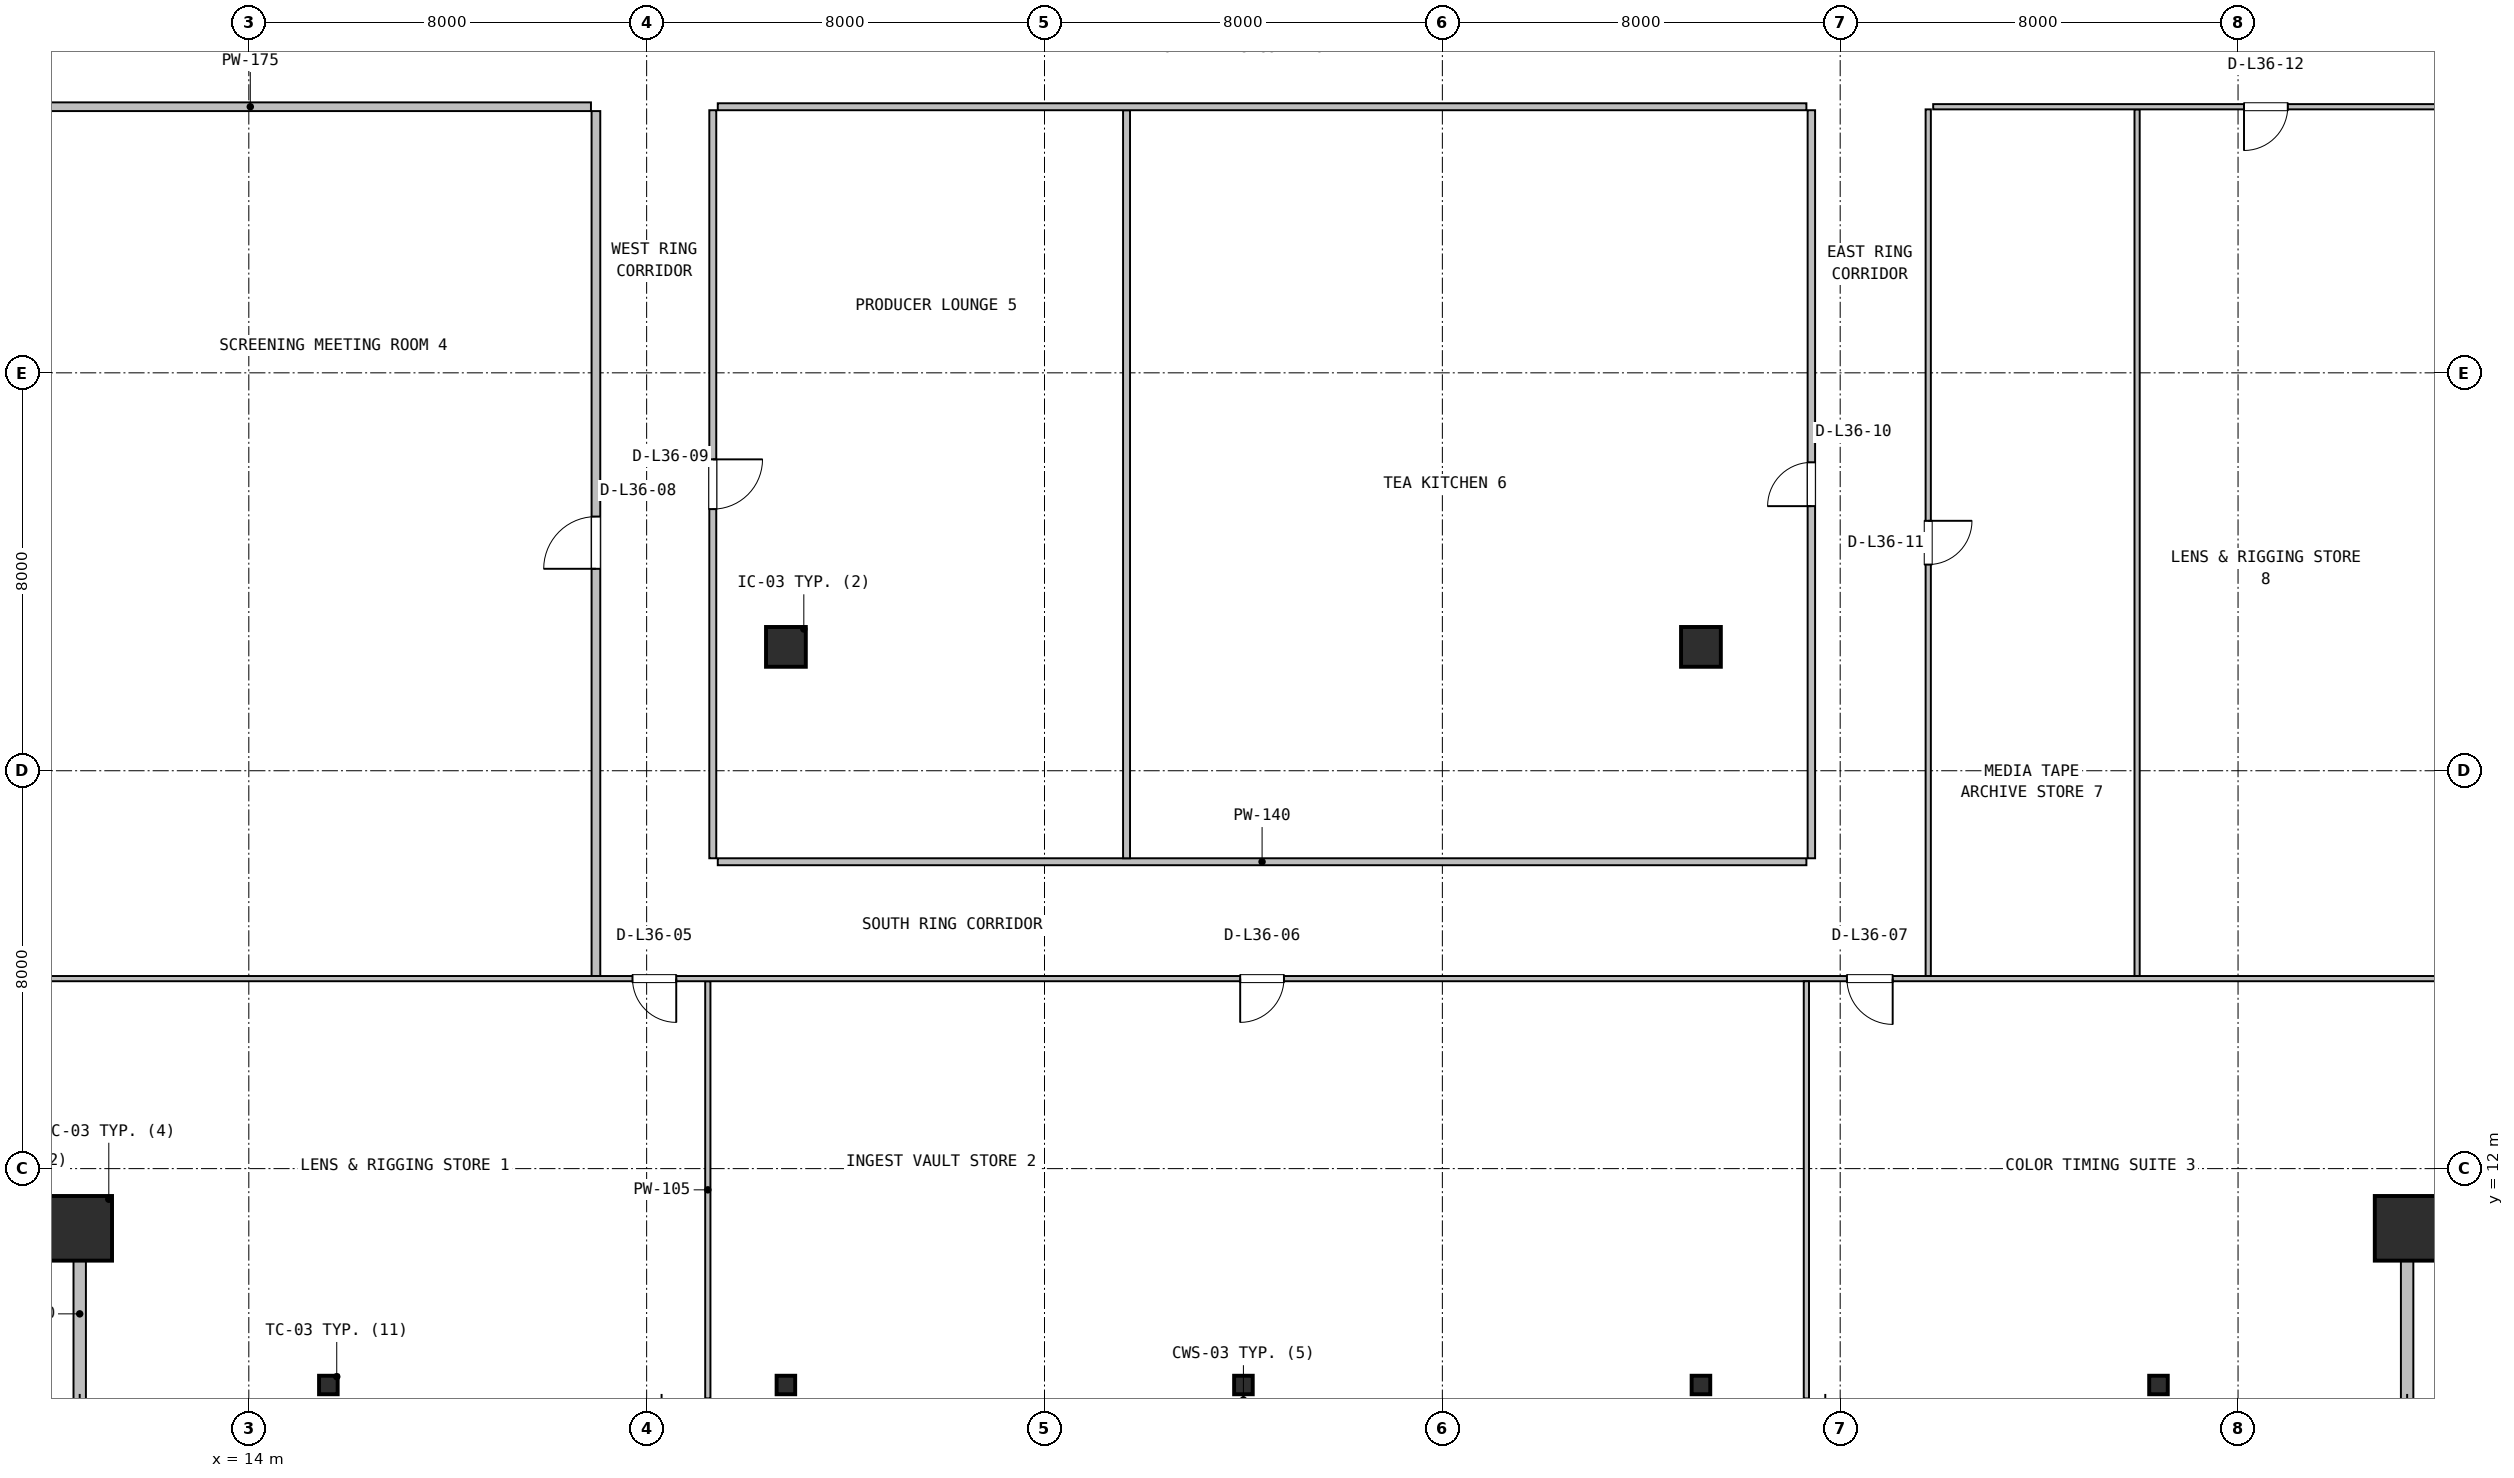
"""IFC4 building model, lengths in metres.
Left out: names, types, materials, properties, quantities, classifications, styles, units other than length and angle.
Written with IfcOpenShell. Run it as: python <this file> out.ifc"""

import sys

from ifc_helpers import new_model, si_unit, direction, frame, frame_2d, origin, origin_2d, place, context, subcontext, project, spatial, rectangle, hollow_rectangle, i_section, extrude, source, transform, mapped, element, fill, save


model = new_model("IFC4")
c1 = context("Model", 3, precision=1e-05, world=origin(), true_north=direction((0.0, 1.0)))
c2 = subcontext(c1, "Body", "Model", "MODEL_VIEW")
j1 = project(units=[si_unit("LENGTHUNIT", "METRE"), si_unit("PLANEANGLEUNIT", "RADIAN")], contexts=[c1])
p1 = place(None, origin())
s1 = spatial("IfcSite", under=j1, at=p1, CompositionType="ELEMENT")
p2 = place(p1, origin())
s2 = spatial("IfcBuilding", under=s1, at=p2, CompositionType="ELEMENT")
p3 = place(p2, frame((0.0, 0.0, 149.6)))
s3 = spatial("IfcBuildingStorey", under=s2, at=p3, CompositionType="ELEMENT", Elevation=149.6)
m1 = source(origin(), c2, "Body", "SweptSolid", [
    extrude(hollow_rectangle(XDim=1.3, YDim=1.3, WallThickness=0.05, at=origin_2d()), origin(), (0.0, 0.0, 1.0), 3.8),
])
for number, where, z_axis, x_axis in (
    (1, (10.6, 10.8, 0.0), (0.0, 0.0, 1.0), (1.0, 0.0, 0.0)),
    (2, (57.4, 10.8, 0.0), (0.0, 0.0, 1.0), (1.0, 0.0, 0.0)),
):
    element("IfcColumn", number, at=place(p3, frame(where, z_axis=z_axis, x_axis=x_axis)), inside=s3, PredefinedType="COLUMN", context=c2, shape_type="MappedRepresentation", body=[
        mapped(m1, transform((0.0, 0.0, 0.0), x_axis=(1.0, 0.0, 0.0), y_axis=(0.0, 1.0, 0.0), z_axis=(0.0, 0.0, 1.0), scale=1.0)),
    ])
m2 = source(origin(), c2, "Body", "SweptSolid", [
    extrude(i_section(OverallWidth=0.374, OverallDepth=0.372, WebThickness=0.016, FlangeThickness=0.026, FilletRadius=0.016, at=origin_2d()), origin(), (0.0, 0.0, 1.0), 3.8),
])
for number, where, z_axis, x_axis in (
    (3, (15.6, 7.65, 0.0), (0.0, 0.0, 1.0), (1.0, 0.0, 0.0)),
    (4, (24.8, 7.65, 0.0), (0.0, 0.0, 1.0), (1.0, 0.0, 0.0)),
    (5, (34.0, 7.65, 0.0), (0.0, 0.0, 1.0), (1.0, 0.0, 0.0)),
    (6, (43.2, 7.65, 0.0), (0.0, 0.0, 1.0), (1.0, 0.0, 0.0)),
    (7, (52.4, 7.65, 0.0), (0.0, 0.0, 1.0), (1.0, 0.0, 0.0)),
):
    element("IfcColumn", number, at=place(p3, frame(where, z_axis=z_axis, x_axis=x_axis)), inside=s3, PredefinedType="COLUMN", context=c2, shape_type="MappedRepresentation", body=[
        mapped(m2, transform((0.0, 0.0, 0.0), x_axis=(1.0, 0.0, 0.0), y_axis=(0.0, 1.0, 0.0), z_axis=(0.0, 0.0, 1.0), scale=1.0)),
    ])
m3 = source(origin(), c2, "Body", "SweptSolid", [
    extrude(rectangle(XDim=0.8, YDim=0.8, at=origin_2d()), origin(), (0.0, 0.0, 1.0), 3.8),
])
for number, where, z_axis, x_axis in (
    (8, (24.8, 22.49, 0.0), (0.0, 0.0, 1.0), (1.0, 0.0, 0.0)),
    (9, (43.2, 22.49, 0.0), (0.0, 0.0, 1.0), (1.0, 0.0, 0.0)),
):
    element("IfcColumn", number, at=place(p3, frame(where, z_axis=z_axis, x_axis=x_axis)), inside=s3, PredefinedType="COLUMN", context=c2, shape_type="MappedRepresentation", body=[
        mapped(m3, transform((0.0, 0.0, 0.0), x_axis=(1.0, 0.0, 0.0), y_axis=(0.0, 1.0, 0.0), z_axis=(0.0, 0.0, 1.0), scale=1.0)),
    ])
for number, where, z_axis, x_axis in (
    (10, (10.6, 7.28, 0.0), (0.0, 0.0, 1.0), (0.0, 1.0, 0.0)),
    (11, (57.4, 7.28, 0.0), (0.0, 0.0, 1.0), (0.0, 1.0, 0.0)),
):
    element("IfcWall", number, at=place(p3, frame(where, z_axis=z_axis, x_axis=x_axis)), inside=s3, PredefinedType="SOLIDWALL", context=c2, shape_type="SweptSolid", body=[
        extrude(rectangle(XDim=3.6, YDim=0.25, at=frame_2d((1.8, 0.0))), origin(), (0.0, 0.0, 1.0), 3.108),
    ])
p4 = place(p3, frame((23.23, 7.38, 0.0), z_axis=(0.0, 0.0, 1.0), x_axis=(0.0, 1.0, 0.0)))
e12 = element("IfcWall", 12, at=p4, inside=s3, PredefinedType="PARTITIONING", context=c2, shape_type="SweptSolid", body=[
    extrude(rectangle(XDim=8.388, YDim=0.105, at=frame_2d((4.194, 0.0))), origin(), (0.0, 0.0, 1.0), 3.108),
])
p5 = place(p3, frame((7.18, 15.82, 0.0), z_axis=(0.0, 0.0, 1.0), x_axis=(1.0, 0.0, 0.0)))
e13 = element("IfcWall", 13, at=p5, inside=s3, PredefinedType="PARTITIONING", context=c2, shape_type="SweptSolid", body=[
    extrude(rectangle(XDim=53.64, YDim=0.105, at=frame_2d((26.82, 0.0))), origin(), (0.0, 0.0, 1.0), 2.909),
])
p6 = place(p5, frame((14.535, 0.0, 0.0)))
e14 = element("IfcOpeningElement", 14, at=p6, cuts=e13, PredefinedType="OPENING", context=c2, shape_type="SweptSolid", body=[
    extrude(rectangle(XDim=0.88, YDim=2.06, at=frame_2d((0.44, 1.03))), frame((0.0, 0.062, 0.0), z_axis=(0.0, -1.0, 0.0), x_axis=(1.0, 0.0, 0.0)), (0.0, 0.0, 1.0), 0.125),
])
p7 = place(p5, frame((26.755, 0.0, 0.0)))
e15 = element("IfcOpeningElement", 15, at=p7, cuts=e13, PredefinedType="OPENING", context=c2, shape_type="SweptSolid", body=[
    extrude(rectangle(XDim=0.88, YDim=2.06, at=frame_2d((0.44, 1.03))), frame((0.0, 0.062, 0.0), z_axis=(0.0, -1.0, 0.0), x_axis=(1.0, 0.0, 0.0)), (0.0, 0.0, 1.0), 0.125),
])
p8 = place(p5, frame((38.955, 0.0, 0.0)))
e16 = element("IfcOpeningElement", 16, at=p8, cuts=e13, PredefinedType="OPENING", context=c2, shape_type="SweptSolid", body=[
    extrude(rectangle(XDim=0.92, YDim=2.08, at=frame_2d((0.46, 1.04))), frame((0.0, 0.062, 0.0), z_axis=(0.0, -1.0, 0.0), x_axis=(1.0, 0.0, 0.0)), (0.0, 0.0, 1.0), 0.125),
])
p9 = place(p3, frame((45.32, 7.38, 0.0), z_axis=(0.0, 0.0, 1.0), x_axis=(0.0, 1.0, 0.0)))
e17 = element("IfcWall", 17, at=p9, inside=s3, PredefinedType="PARTITIONING", context=c2, shape_type="SweptSolid", body=[
    extrude(rectangle(XDim=8.388, YDim=0.105, at=frame_2d((4.194, 0.0))), origin(), (0.0, 0.0, 1.0), 3.108),
])
p10 = place(p3, frame((20.98, 15.873, 0.0), z_axis=(0.0, 0.0, 1.0), x_axis=(0.0, 1.0, 0.0)))
e18 = element("IfcWall", 18, at=p10, inside=s3, PredefinedType="PARTITIONING", context=c2, shape_type="SweptSolid", body=[
    extrude(rectangle(XDim=17.39, YDim=0.175, at=frame_2d((8.695, 0.0))), origin(), (0.0, 0.0, 1.0), 3.222),
])
p11 = place(p10, frame((8.187, 0.0, 0.0)))
e19 = element("IfcOpeningElement", 19, at=p11, cuts=e18, PredefinedType="OPENING", context=c2, shape_type="SweptSolid", body=[
    extrude(rectangle(XDim=1.05, YDim=2.1, at=frame_2d((0.525, 1.05))), frame((0.0, 0.098, 0.0), z_axis=(0.0, -1.0, 0.0), x_axis=(1.0, 0.0, 0.0)), (0.0, 0.0, 1.0), 0.195),
])
p12 = place(p3, frame((7.18, 33.35, 0.0), z_axis=(0.0, 0.0, 1.0), x_axis=(1.0, 0.0, 0.0)))
e20 = element("IfcWall", 20, at=p12, inside=s3, PredefinedType="PARTITIONING", context=c2, shape_type="SweptSolid", body=[
    extrude(rectangle(XDim=13.7, YDim=0.175, at=frame_2d((6.85, 0.0))), origin(), (0.0, 0.0, 1.0), 3.108),
])
p13 = place(p3, frame((23.43, 18.17, 0.0), z_axis=(0.0, 0.0, 1.0), x_axis=(1.0, 0.0, 0.0)))
e21 = element("IfcWall", 21, at=p13, inside=s3, PredefinedType="PARTITIONING", context=c2, shape_type="SweptSolid", body=[
    extrude(rectangle(XDim=21.89, YDim=0.14, at=frame_2d((10.945, 0.0))), origin(), (0.0, 0.0, 1.0), 2.909),
])
p14 = place(p3, frame((31.65, 18.24, 0.0), z_axis=(0.0, 0.0, 1.0), x_axis=(0.0, 1.0, 0.0)))
e22 = element("IfcWall", 22, at=p14, inside=s3, PredefinedType="PARTITIONING", context=c2, shape_type="SweptSolid", body=[
    extrude(rectangle(XDim=15.04, YDim=0.14, at=frame_2d((7.52, 0.0))), origin(), (0.0, 0.0, 1.0), 2.909),
])
p15 = place(p3, frame((23.43, 33.35, 0.0), z_axis=(0.0, 0.0, 1.0), x_axis=(1.0, 0.0, 0.0)))
e23 = element("IfcWall", 23, at=p15, inside=s3, PredefinedType="PARTITIONING", context=c2, shape_type="SweptSolid", body=[
    extrude(rectangle(XDim=21.89, YDim=0.14, at=frame_2d((10.945, 0.0))), origin(), (0.0, 0.0, 1.0), 2.909),
])
p16 = place(p3, frame((23.33, 18.24, 0.0), z_axis=(0.0, 0.0, 1.0), x_axis=(0.0, 1.0, 0.0)))
e24 = element("IfcWall", 24, at=p16, inside=s3, PredefinedType="PARTITIONING", context=c2, shape_type="SweptSolid", body=[
    extrude(rectangle(XDim=15.04, YDim=0.14, at=frame_2d((7.52, 0.0))), origin(), (0.0, 0.0, 1.0), 3.222),
])
p17 = place(p16, frame((7.02, 0.0, 0.0)))
e25 = element("IfcOpeningElement", 25, at=p17, cuts=e24, PredefinedType="OPENING", context=c2, shape_type="SweptSolid", body=[
    extrude(rectangle(XDim=1.0, YDim=2.1, at=frame_2d((0.5, 1.05))), frame((0.0, 0.08, 0.0), z_axis=(0.0, -1.0, 0.0), x_axis=(1.0, 0.0, 0.0)), (0.0, 0.0, 1.0), 0.16),
])
p18 = place(p3, frame((45.42, 18.24, 0.0), z_axis=(0.0, 0.0, 1.0), x_axis=(0.0, 1.0, 0.0)))
e26 = element("IfcWall", 26, at=p18, inside=s3, PredefinedType="PARTITIONING", context=c2, shape_type="SweptSolid", body=[
    extrude(rectangle(XDim=15.04, YDim=0.15, at=frame_2d((7.52, 0.0))), origin(), (0.0, 0.0, 1.0), 3.222),
])
p19 = place(p18, frame((7.08, 0.0, 0.0)))
e27 = element("IfcOpeningElement", 27, at=p19, cuts=e26, PredefinedType="OPENING", context=c2, shape_type="SweptSolid", body=[
    extrude(rectangle(XDim=0.88, YDim=2.06, at=frame_2d((0.44, 1.03))), frame((0.0, 0.085, 0.0), z_axis=(0.0, -1.0, 0.0), x_axis=(1.0, 0.0, 0.0)), (0.0, 0.0, 1.0), 0.17),
])
p20 = place(p3, frame((51.97, 15.873, 0.0), z_axis=(0.0, 0.0, 1.0), x_axis=(0.0, 1.0, 0.0)))
e28 = element("IfcWall", 28, at=p20, inside=s3, PredefinedType="PARTITIONING", context=c2, shape_type="SweptSolid", body=[
    extrude(rectangle(XDim=17.424, YDim=0.105, at=frame_2d((8.712, 0.0))), origin(), (0.0, 0.0, 1.0), 3.222),
])
p21 = place(p3, frame((47.87, 33.35, 0.0), z_axis=(0.0, 0.0, 1.0), x_axis=(1.0, 0.0, 0.0)))
e29 = element("IfcWall", 29, at=p21, inside=s3, PredefinedType="PARTITIONING", context=c2, shape_type="SweptSolid", body=[
    extrude(rectangle(XDim=12.95, YDim=0.105, at=frame_2d((6.475, 0.0))), origin(), (0.0, 0.0, 1.0), 3.108),
])
p22 = place(p21, frame((6.25, 0.0, 0.0)))
e30 = element("IfcOpeningElement", 30, at=p22, cuts=e29, PredefinedType="OPENING", context=c2, shape_type="SweptSolid", body=[
    extrude(rectangle(XDim=0.88, YDim=2.06, at=frame_2d((0.44, 1.03))), frame((0.0, 0.062, 0.0), z_axis=(0.0, -1.0, 0.0), x_axis=(1.0, 0.0, 0.0)), (0.0, 0.0, 1.0), 0.125),
])
p23 = place(p3, frame((47.77, 15.873, 0.0), z_axis=(0.0, 0.0, 1.0), x_axis=(0.0, 1.0, 0.0)))
e31 = element("IfcWall", 31, at=p23, inside=s3, PredefinedType="PARTITIONING", context=c2, shape_type="SweptSolid", body=[
    extrude(rectangle(XDim=17.424, YDim=0.105, at=frame_2d((8.712, 0.0))), origin(), (0.0, 0.0, 1.0), 3.222),
])
p24 = place(p23, frame((8.272, 0.0, 0.0)))
e32 = element("IfcOpeningElement", 32, at=p24, cuts=e31, PredefinedType="OPENING", context=c2, shape_type="SweptSolid", body=[
    extrude(rectangle(XDim=0.88, YDim=2.06, at=frame_2d((0.44, 1.03))), frame((0.0, 0.062, 0.0), z_axis=(0.0, -1.0, 0.0), x_axis=(1.0, 0.0, 0.0)), (0.0, 0.0, 1.0), 0.125),
])
m4 = source(origin(), c2, "Body", "SweptSolid", [
    extrude(rectangle(XDim=0.88, YDim=2.06, at=frame_2d((0.44, 1.03))), frame((0.0, 0.025, 0.0), z_axis=(0.0, -1.0, 0.0), x_axis=(1.0, 0.0, 0.0)), (0.0, 0.0, 1.0), 0.05),
])
p25 = place(p6, frame((0.88, 0.0, 0.0), z_axis=(0.0, 0.0, 1.0), x_axis=(-1.0, 0.0, 0.0)))
e33 = element("IfcDoor", 33, at=p25, inside=s3, OperationType="SINGLE_SWING_RIGHT", PredefinedType="DOOR", context=c2, shape_type="MappedRepresentation", body=[
    mapped(m4, transform((0.0, 0.0, 0.0), x_axis=(1.0, 0.0, 0.0), y_axis=(0.0, 1.0, 0.0), z_axis=(0.0, 0.0, 1.0), scale=1.0)),
])
fill(e14, e33)
p26 = place(p7, frame((0.88, 0.0, 0.0), z_axis=(0.0, 0.0, 1.0), x_axis=(-1.0, 0.0, 0.0)))
e34 = element("IfcDoor", 34, at=p26, inside=s3, OperationType="SINGLE_SWING_LEFT", PredefinedType="DOOR", context=c2, shape_type="MappedRepresentation", body=[
    mapped(m4, transform((0.0, 0.0, 0.0), x_axis=(1.0, 0.0, 0.0), y_axis=(0.0, 1.0, 0.0), z_axis=(0.0, 0.0, 1.0), scale=1.0)),
])
fill(e15, e34)
m5 = source(origin(), c2, "Body", "SweptSolid", [
    extrude(rectangle(XDim=0.92, YDim=2.08, at=frame_2d((0.46, 1.04))), frame((0.0, 0.025, 0.0), z_axis=(0.0, -1.0, 0.0), x_axis=(1.0, 0.0, 0.0)), (0.0, 0.0, 1.0), 0.05),
])
p27 = place(p8, frame((0.92, 0.0, 0.0), z_axis=(0.0, 0.0, 1.0), x_axis=(-1.0, 0.0, 0.0)))
e35 = element("IfcDoor", 35, at=p27, inside=s3, OperationType="SINGLE_SWING_RIGHT", PredefinedType="DOOR", context=c2, shape_type="MappedRepresentation", body=[
    mapped(m5, transform((0.0, 0.0, 0.0), x_axis=(1.0, 0.0, 0.0), y_axis=(0.0, 1.0, 0.0), z_axis=(0.0, 0.0, 1.0), scale=1.0)),
])
fill(e16, e35)
m6 = source(origin(), c2, "Body", "SweptSolid", [
    extrude(rectangle(XDim=1.05, YDim=2.1, at=frame_2d((0.525, 1.05))), frame((0.0, 0.025, 0.0), z_axis=(0.0, -1.0, 0.0), x_axis=(1.0, 0.0, 0.0)), (0.0, 0.0, 1.0), 0.05),
])
p28 = place(p11, origin())
e36 = element("IfcDoor", 36, at=p28, inside=s3, OperationType="SINGLE_SWING_LEFT", PredefinedType="DOOR", context=c2, shape_type="MappedRepresentation", body=[
    mapped(m6, transform((0.0, 0.0, 0.0), x_axis=(1.0, 0.0, 0.0), y_axis=(0.0, 1.0, 0.0), z_axis=(0.0, 0.0, 1.0), scale=1.0)),
])
fill(e19, e36)
m7 = source(origin(), c2, "Body", "SweptSolid", [
    extrude(rectangle(XDim=1.0, YDim=2.1, at=frame_2d((0.5, 1.05))), frame((0.0, 0.025, 0.0), z_axis=(0.0, -1.0, 0.0), x_axis=(1.0, 0.0, 0.0)), (0.0, 0.0, 1.0), 0.05),
])
p29 = place(p17, frame((1.0, 0.0, 0.0), z_axis=(0.0, 0.0, 1.0), x_axis=(-1.0, 0.0, 0.0)))
e37 = element("IfcDoor", 37, at=p29, inside=s3, OperationType="SINGLE_SWING_RIGHT", PredefinedType="DOOR", context=c2, shape_type="MappedRepresentation", body=[
    mapped(m7, transform((0.0, 0.0, 0.0), x_axis=(1.0, 0.0, 0.0), y_axis=(0.0, 1.0, 0.0), z_axis=(0.0, 0.0, 1.0), scale=1.0)),
])
fill(e25, e37)
p30 = place(p19, origin())
e38 = element("IfcDoor", 38, at=p30, inside=s3, OperationType="SINGLE_SWING_LEFT", PredefinedType="DOOR", context=c2, shape_type="MappedRepresentation", body=[
    mapped(m4, transform((0.0, 0.0, 0.0), x_axis=(1.0, 0.0, 0.0), y_axis=(0.0, 1.0, 0.0), z_axis=(0.0, 0.0, 1.0), scale=1.0)),
])
fill(e27, e38)
p31 = place(p24, frame((0.88, 0.0, 0.0), z_axis=(0.0, 0.0, 1.0), x_axis=(-1.0, 0.0, 0.0)))
e39 = element("IfcDoor", 39, at=p31, inside=s3, OperationType="SINGLE_SWING_RIGHT", PredefinedType="DOOR", context=c2, shape_type="MappedRepresentation", body=[
    mapped(m4, transform((0.0, 0.0, 0.0), x_axis=(1.0, 0.0, 0.0), y_axis=(0.0, 1.0, 0.0), z_axis=(0.0, 0.0, 1.0), scale=1.0)),
])
fill(e32, e39)
p32 = place(p22, frame((0.88, 0.0, 0.0), z_axis=(0.0, 0.0, 1.0), x_axis=(-1.0, 0.0, 0.0)))
e40 = element("IfcDoor", 40, at=p32, inside=s3, OperationType="SINGLE_SWING_LEFT", PredefinedType="DOOR", context=c2, shape_type="MappedRepresentation", body=[
    mapped(m4, transform((0.0, 0.0, 0.0), x_axis=(1.0, 0.0, 0.0), y_axis=(0.0, 1.0, 0.0), z_axis=(0.0, 0.0, 1.0), scale=1.0)),
])
fill(e30, e40)
save(model, sys.argv[1])
